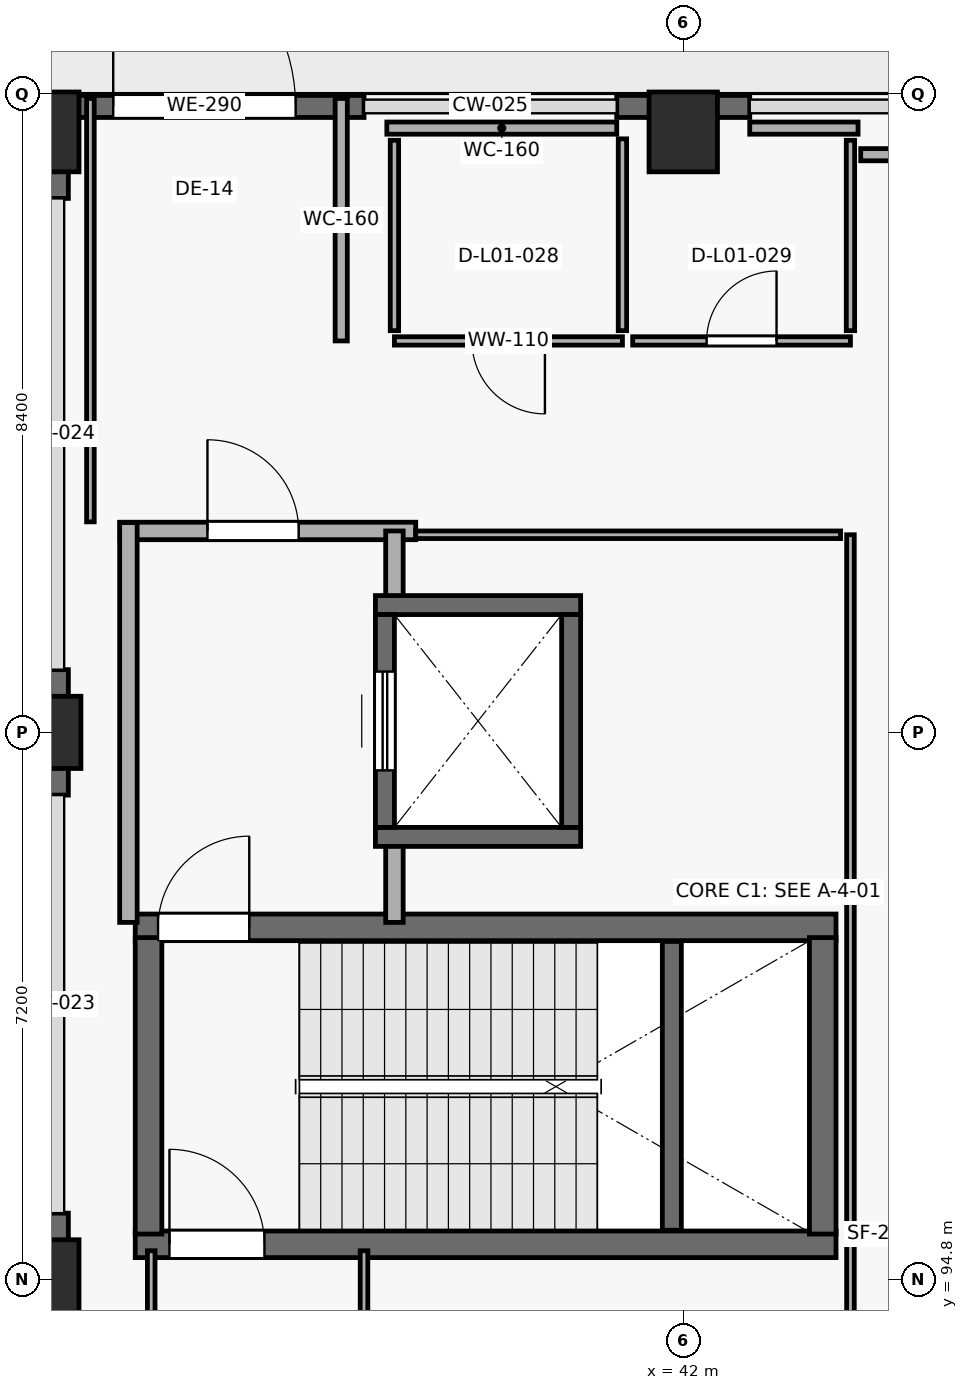
"""IFC4 building model, lengths in metres.
Left out: names, types, materials, properties, quantities, classifications, styles, units other than length and angle.
Written with IfcOpenShell. Run it as: python <this file> out.ifc"""

import sys

from ifc_helpers import new_model, si_unit, direction, frame, frame_2d, origin, origin_2d, place, context, subcontext, project, spatial, rectangle, extrude, element, fill, save


model = new_model("IFC4")
c1 = context("Model", 3, precision=1e-05, world=origin(), true_north=direction((0.0, 1.0)))
c2 = subcontext(c1, "Body", "Model", "MODEL_VIEW")
j1 = project(units=[si_unit("LENGTHUNIT", "METRE"), si_unit("PLANEANGLEUNIT", "RADIAN")], contexts=[c1])
p1 = place(None, origin())
s1 = spatial("IfcSite", under=j1, at=p1, CompositionType="ELEMENT")
p2 = place(p1, origin())
s2 = spatial("IfcBuilding", under=s1, at=p2, CompositionType="ELEMENT")
p3 = place(p2, origin())
s3 = spatial("IfcBuildingStorey", under=s2, at=p3, CompositionType="ELEMENT", Elevation=0.0)
p4 = place(p3, frame((33.6, 94.8, 0.0), z_axis=(0.0, 0.0, 1.0), x_axis=(1.0, 0.0, 0.0)))
e1 = element("IfcColumn", 1, at=p4, inside=s3, PredefinedType="COLUMN", context=c2, shape_type="SweptSolid", body=[
    extrude(rectangle(XDim=0.9, YDim=1.05, at=origin_2d()), origin(), (0.0, 0.0, 1.0), 5.4),
])
p5 = place(p3, frame((33.6, 102.0, 0.0), z_axis=(0.0, 0.0, 1.0), x_axis=(1.0, 0.0, 0.0)))
e2 = element("IfcColumn", 2, at=p5, inside=s3, PredefinedType="COLUMN", context=c2, shape_type="SweptSolid", body=[
    extrude(rectangle(XDim=0.95, YDim=0.95, at=origin_2d()), origin(), (0.0, 0.0, 1.0), 5.4),
])
for number, where, z_axis, x_axis in (
    (3, (33.6, 109.9, 0.0), (0.0, 0.0, 1.0), (1.0, 0.0, 0.0)),
    (4, (42.0, 109.9, 0.0), (0.0, 0.0, 1.0), (1.0, 0.0, 0.0)),
):
    element("IfcColumn", number, at=place(p3, frame(where, z_axis=z_axis, x_axis=x_axis)), inside=s3, PredefinedType="COLUMN", context=c2, shape_type="SweptSolid", body=[
        extrude(rectangle(XDim=0.9, YDim=1.05, at=origin_2d()), origin(), (0.0, 0.0, 1.0), 5.4),
    ])
p6 = place(p3, frame((33.765, 93.925, 0.0), z_axis=(0.0, 0.0, 1.0), x_axis=(0.0, 1.0, 0.0)))
e5 = element("IfcWall", 5, at=p6, inside=s3, PredefinedType="SOLIDWALL", context=c2, shape_type="SweptSolid", body=[
    extrude(rectangle(XDim=1.75, YDim=0.29, at=frame_2d((0.875, 0.0))), origin(), (0.0, 0.0, 1.0), 5.12),
])
p7 = place(p3, frame((33.765, 101.175, 0.0), z_axis=(0.0, 0.0, 1.0), x_axis=(0.0, 1.0, 0.0)))
e6 = element("IfcWall", 6, at=p7, inside=s3, PredefinedType="SOLIDWALL", context=c2, shape_type="SweptSolid", body=[
    extrude(rectangle(XDim=1.65, YDim=0.29, at=frame_2d((0.825, 0.0))), origin(), (0.0, 0.0, 1.0), 5.12),
])
p8 = place(p3, frame((33.765, 109.025, 0.0), z_axis=(0.0, 0.0, 1.0), x_axis=(0.0, 1.0, 0.0)))
e7 = element("IfcWall", 7, at=p8, inside=s3, PredefinedType="SOLIDWALL", context=c2, shape_type="SweptSolid", body=[
    extrude(rectangle(XDim=1.375, YDim=0.29, at=frame_2d((0.688, 0.0))), origin(), (0.0, 0.0, 1.0), 5.12),
])
p9 = place(p3, frame((33.6, 110.235, 0.0), z_axis=(0.0, 0.0, 1.0), x_axis=(1.0, 0.0, 0.0)))
e8 = element("IfcWall", 8, at=p9, inside=s3, PredefinedType="SOLIDWALL", context=c2, shape_type="SweptSolid", body=[
    extrude(rectangle(XDim=4.2, YDim=0.29, at=frame_2d((2.1, 0.0))), origin(), (0.0, 0.0, 1.0), 5.12),
])
p10 = place(p9, frame((0.9, 0.0, 0.0)))
e9 = element("IfcOpeningElement", 9, at=p10, cuts=e8, PredefinedType="OPENING", context=c2, shape_type="SweptSolid", body=[
    extrude(rectangle(XDim=2.4, YDim=2.7, at=frame_2d((1.2, 1.35))), frame((0.0, 0.155, 0.0), z_axis=(0.0, -1.0, 0.0), x_axis=(1.0, 0.0, 0.0)), (0.0, 0.0, 1.0), 0.31),
])
p11 = place(p3, frame((41.125, 110.235, 0.0), z_axis=(0.0, 0.0, 1.0), x_axis=(1.0, 0.0, 0.0)))
e10 = element("IfcWall", 10, at=p11, inside=s3, PredefinedType="SOLIDWALL", context=c2, shape_type="SweptSolid", body=[
    extrude(rectangle(XDim=1.75, YDim=0.29, at=frame_2d((0.875, 0.0))), origin(), (0.0, 0.0, 1.0), 5.12),
])
p12 = place(p3, frame((34.79, 95.265, 0.0), z_axis=(0.0, 0.0, 1.0), x_axis=(1.0, 0.0, 0.0)))
e11 = element("IfcWall", 11, at=p12, inside=s3, PredefinedType="SHEAR", context=c2, shape_type="SweptSolid", body=[
    extrude(rectangle(XDim=9.22, YDim=0.35, at=frame_2d((4.61, 0.0))), origin(), (0.0, 0.0, 1.0), 5.12),
])
p13 = place(p12, frame((0.45, 0.0, 0.0)))
e12 = element("IfcOpeningElement", 12, at=p13, cuts=e11, PredefinedType="OPENING", context=c2, shape_type="SweptSolid", body=[
    extrude(rectangle(XDim=1.25, YDim=2.2, at=frame_2d((0.625, 1.1))), frame((0.0, 0.185, 0.0), z_axis=(0.0, -1.0, 0.0), x_axis=(1.0, 0.0, 0.0)), (0.0, 0.0, 1.0), 0.37),
])
p14 = place(p3, frame((44.01, 99.435, 0.0), z_axis=(0.0, 0.0, 1.0), x_axis=(-1.0, 0.0, 0.0)))
e13 = element("IfcWall", 13, at=p14, inside=s3, PredefinedType="SHEAR", context=c2, shape_type="SweptSolid", body=[
    extrude(rectangle(XDim=9.22, YDim=0.35, at=frame_2d((4.61, 0.0))), origin(), (0.0, 0.0, 1.0), 5.12),
])
p15 = place(p14, frame((7.72, 0.0, 0.0)))
e14 = element("IfcOpeningElement", 14, at=p15, cuts=e13, PredefinedType="OPENING", context=c2, shape_type="SweptSolid", body=[
    extrude(rectangle(XDim=1.2, YDim=2.2, at=frame_2d((0.6, 1.1))), frame((0.0, 0.185, 0.0), z_axis=(0.0, -1.0, 0.0), x_axis=(1.0, 0.0, 0.0)), (0.0, 0.0, 1.0), 0.37),
])
for number, where, z_axis, x_axis in (
    (15, (34.965, 95.4, 0.0), (0.0, 0.0, 1.0), (0.0, 1.0, 0.0)),
    (16, (43.835, 99.3, 0.0), (0.0, 0.0, 1.0), (0.0, -1.0, 0.0)),
):
    element("IfcWall", number, at=place(p3, frame(where, z_axis=z_axis, x_axis=x_axis)), inside=s3, PredefinedType="SHEAR", context=c2, shape_type="SweptSolid", body=[
        extrude(rectangle(XDim=3.9, YDim=0.35, at=frame_2d((1.95, 0.0))), origin(), (0.0, 0.0, 1.0), 5.12),
    ])
p16 = place(p3, frame((41.85, 95.45, 0.0), z_axis=(0.0, 0.0, 1.0), x_axis=(0.0, 1.0, 0.0)))
e17 = element("IfcWall", 17, at=p16, inside=s3, PredefinedType="SHEAR", context=c2, shape_type="SweptSolid", body=[
    extrude(rectangle(XDim=3.8, YDim=0.25, at=frame_2d((1.9, 0.0))), origin(), (0.0, 0.0, 1.0), 2.52),
])
p17 = place(p3, frame((34.59, 104.65, 0.0), z_axis=(0.0, 0.0, 1.0), x_axis=(1.0, 0.0, 0.0)))
e18 = element("IfcWall", 18, at=p17, inside=s3, PredefinedType="PARTITIONING", context=c2, shape_type="SweptSolid", body=[
    extrude(rectangle(XDim=3.89, YDim=0.23, at=frame_2d((1.945, 0.0))), origin(), (0.0, 0.0, 1.0), 5.12),
])
p18 = place(p17, frame((1.15, 0.0, 0.0)))
e19 = element("IfcOpeningElement", 19, at=p18, cuts=e18, PredefinedType="OPENING", context=c2, shape_type="SweptSolid", body=[
    extrude(rectangle(XDim=1.2, YDim=2.2, at=frame_2d((0.6, 1.1))), frame((0.0, 0.125, 0.0), z_axis=(0.0, -1.0, 0.0), x_axis=(1.0, 0.0, 0.0)), (0.0, 0.0, 1.0), 0.25),
])
p19 = place(p3, frame((34.7, 99.5, 0.0), z_axis=(0.0, 0.0, 1.0), x_axis=(0.0, 1.0, 0.0)))
e20 = element("IfcWall", 20, at=p19, inside=s3, PredefinedType="PARTITIONING", context=c2, shape_type="SweptSolid", body=[
    extrude(rectangle(XDim=5.26, YDim=0.23, at=frame_2d((2.63, 0.0))), origin(), (0.0, 0.0, 1.0), 5.12),
])
p20 = place(p3, frame((38.2, 104.65, 0.0), z_axis=(0.0, 0.0, 1.0), x_axis=(0.0, -1.0, 0.0)))
e21 = element("IfcWall", 21, at=p20, inside=s3, PredefinedType="PARTITIONING", context=c2, shape_type="SweptSolid", body=[
    extrude(rectangle(XDim=1.1, YDim=0.23, at=frame_2d((0.55, 0.0))), origin(), (0.0, 0.0, 1.0), 5.12),
])
p21 = place(p3, frame((38.2, 100.75, 0.0), z_axis=(0.0, 0.0, 1.0), x_axis=(0.0, -1.0, 0.0)))
e22 = element("IfcWall", 22, at=p21, inside=s3, PredefinedType="PARTITIONING", context=c2, shape_type="SweptSolid", body=[
    extrude(rectangle(XDim=1.25, YDim=0.23, at=frame_2d((0.625, 0.0))), origin(), (0.0, 0.0, 1.0), 5.12),
])
for number, where, z_axis, x_axis in (
    (23, (37.95, 100.625, 0.0), (0.0, 0.0, 1.0), (1.0, 0.0, 0.0)),
    (24, (40.65, 103.675, 0.0), (0.0, 0.0, 1.0), (-1.0, 0.0, 0.0)),
):
    element("IfcWall", number, at=place(p3, frame(where, z_axis=z_axis, x_axis=x_axis)), inside=s3, PredefinedType="SHEAR", context=c2, shape_type="SweptSolid", body=[
        extrude(rectangle(XDim=2.7, YDim=0.25, at=frame_2d((1.35, 0.0))), origin(), (0.0, 0.0, 1.0), 5.12),
    ])
p22 = place(p3, frame((38.075, 100.75, 0.0), z_axis=(0.0, 0.0, 1.0), x_axis=(0.0, 1.0, 0.0)))
e25 = element("IfcWall", 25, at=p22, inside=s3, PredefinedType="SHEAR", context=c2, shape_type="SweptSolid", body=[
    extrude(rectangle(XDim=2.8, YDim=0.25, at=frame_2d((1.4, 0.0))), origin(), (0.0, 0.0, 1.0), 5.12),
])
p23 = place(p22, frame((0.75, 0.0, 0.0)))
e26 = element("IfcOpeningElement", 26, at=p23, cuts=e25, PredefinedType="OPENING", context=c2, shape_type="SweptSolid", body=[
    extrude(rectangle(XDim=1.3, YDim=2.25, at=frame_2d((0.65, 1.125))), frame((0.0, 0.135, 0.0), z_axis=(0.0, -1.0, 0.0), x_axis=(1.0, 0.0, 0.0)), (0.0, 0.0, 1.0), 0.27),
])
p24 = place(p3, frame((40.525, 103.55, 0.0), z_axis=(0.0, 0.0, 1.0), x_axis=(0.0, -1.0, 0.0)))
e27 = element("IfcWall", 27, at=p24, inside=s3, PredefinedType="SHEAR", context=c2, shape_type="SweptSolid", body=[
    extrude(rectangle(XDim=2.8, YDim=0.25, at=frame_2d((1.4, 0.0))), origin(), (0.0, 0.0, 1.0), 5.12),
])
p25 = place(p3, frame((44.2, 104.6, 0.0), z_axis=(0.0, 0.0, 1.0), x_axis=(0.0, -1.0, 0.0)))
e28 = element("IfcWall", 28, at=p25, inside=s3, PredefinedType="PARTITIONING", context=c2, shape_type="SweptSolid", body=[
    extrude(rectangle(XDim=10.75, YDim=0.1, at=frame_2d((5.375, 0.0))), origin(), (0.0, 0.0, 1.0), 5.12),
])
p26 = place(p3, frame((44.3, 109.95, 0.0), z_axis=(0.0, 0.0, 1.0), x_axis=(-1.0, 0.0, 0.0)))
e29 = element("IfcWall", 29, at=p26, inside=s3, PredefinedType="PARTITIONING", context=c2, shape_type="SweptSolid", body=[
    extrude(rectangle(XDim=1.425, YDim=0.16, at=frame_2d((0.712, 0.0))), origin(), (0.0, 0.0, 1.0), 4.36),
])
p27 = place(p3, frame((41.125, 109.95, 0.0), z_axis=(0.0, 0.0, 1.0), x_axis=(-1.0, 0.0, 0.0)))
e30 = element("IfcWall", 30, at=p27, inside=s3, PredefinedType="PARTITIONING", context=c2, shape_type="SweptSolid", body=[
    extrude(rectangle(XDim=3.025, YDim=0.16, at=frame_2d((1.512, 0.0))), origin(), (0.0, 0.0, 1.0), 4.36),
])
p28 = place(p3, frame((38.48, 104.6, 0.0), z_axis=(0.0, 0.0, 1.0), x_axis=(1.0, 0.0, 0.0)))
e31 = element("IfcWall", 31, at=p28, inside=s3, PredefinedType="PARTITIONING", context=c2, shape_type="SweptSolid", body=[
    extrude(rectangle(XDim=5.59, YDim=0.1, at=frame_2d((2.795, 0.0))), origin(), (0.0, 0.0, 1.0), 5.12),
])
p29 = place(p3, frame((34.2, 110.34, 0.0), z_axis=(0.0, 0.0, 1.0), x_axis=(0.0, -1.0, 0.0)))
e32 = element("IfcWall", 32, at=p29, inside=s3, PredefinedType="PARTITIONING", context=c2, shape_type="SweptSolid", body=[
    extrude(rectangle(XDim=5.57, YDim=0.1, at=frame_2d((2.785, 0.0))), origin(), (0.0, 0.0, 1.0), 4.36),
])
p30 = place(p3, frame((37.5, 107.15, 0.0), z_axis=(0.0, 0.0, 1.0), x_axis=(0.0, 1.0, 0.0)))
e33 = element("IfcWall", 33, at=p30, inside=s3, PredefinedType="PARTITIONING", context=c2, shape_type="SweptSolid", body=[
    extrude(rectangle(XDim=3.19, YDim=0.16, at=frame_2d((1.595, 0.0))), origin(), (0.0, 0.0, 1.0), 5.12),
])
p31 = place(p3, frame((41.2, 107.15, 0.0), z_axis=(0.0, 0.0, 1.0), x_axis=(-1.0, 0.0, 0.0)))
e34 = element("IfcWall", 34, at=p31, inside=s3, PredefinedType="PARTITIONING", context=c2, shape_type="SweptSolid", body=[
    extrude(rectangle(XDim=3.0, YDim=0.11, at=frame_2d((1.5, 0.0))), origin(), (0.0, 0.0, 1.0), 5.12),
])
p32 = place(p31, frame((1.02, 0.0, 0.0)))
e35 = element("IfcOpeningElement", 35, at=p32, cuts=e34, PredefinedType="OPENING", context=c2, shape_type="SweptSolid", body=[
    extrude(rectangle(XDim=0.96, YDim=2.14, at=frame_2d((0.48, 1.07))), frame((0.0, 0.065, 0.0), z_axis=(0.0, -1.0, 0.0), x_axis=(1.0, 0.0, 0.0)), (0.0, 0.0, 1.0), 0.13),
])
p33 = place(p3, frame((44.2, 107.15, 0.0), z_axis=(0.0, 0.0, 1.0), x_axis=(-1.0, 0.0, 0.0)))
e36 = element("IfcWall", 36, at=p33, inside=s3, PredefinedType="PARTITIONING", context=c2, shape_type="SweptSolid", body=[
    extrude(rectangle(XDim=2.865, YDim=0.11, at=frame_2d((1.433, 0.0))), origin(), (0.0, 0.0, 1.0), 5.12),
])
p34 = place(p33, frame((0.972, 0.0, 0.0)))
e37 = element("IfcOpeningElement", 37, at=p34, cuts=e36, PredefinedType="OPENING", context=c2, shape_type="SweptSolid", body=[
    extrude(rectangle(XDim=0.92, YDim=2.12, at=frame_2d((0.46, 1.06))), frame((0.0, 0.065, 0.0), z_axis=(0.0, -1.0, 0.0), x_axis=(1.0, 0.0, 0.0)), (0.0, 0.0, 1.0), 0.13),
])
p35 = place(p3, frame((41.2, 109.809, 0.0), z_axis=(0.0, 0.0, 1.0), x_axis=(0.0, -1.0, 0.0)))
e38 = element("IfcWall", 38, at=p35, inside=s3, PredefinedType="PARTITIONING", context=c2, shape_type="SweptSolid", body=[
    extrude(rectangle(XDim=2.524, YDim=0.11, at=frame_2d((1.262, 0.0))), origin(), (0.0, 0.0, 1.0), 5.12),
])
for number, where, z_axis, x_axis in (
    (39, (38.2, 107.285, 0.0), (0.0, 0.0, 1.0), (0.0, 1.0, 0.0)),
    (40, (44.2, 109.79, 0.0), (0.0, 0.0, 1.0), (0.0, -1.0, 0.0)),
):
    element("IfcWall", number, at=place(p3, frame(where, z_axis=z_axis, x_axis=x_axis)), inside=s3, PredefinedType="PARTITIONING", context=c2, shape_type="SweptSolid", body=[
        extrude(rectangle(XDim=2.505, YDim=0.11, at=frame_2d((1.252, 0.0))), origin(), (0.0, 0.0, 1.0), 5.12),
    ])
p36 = place(p3, frame((46.24, 109.6, 0.0), z_axis=(0.0, 0.0, 1.0), x_axis=(-1.0, 0.0, 0.0)))
e41 = element("IfcWall", 41, at=p36, inside=s3, PredefinedType="PARTITIONING", context=c2, shape_type="SweptSolid", body=[
    extrude(rectangle(XDim=1.905, YDim=0.16, at=frame_2d((0.953, 0.0))), origin(), (0.0, 0.0, 1.0), 4.36),
])
p37 = place(p3, frame((37.8, 93.98, 0.0), z_axis=(0.0, 0.0, 1.0), x_axis=(0.0, 1.0, 0.0)))
e42 = element("IfcWall", 42, at=p37, inside=s3, PredefinedType="PARTITIONING", context=c2, shape_type="SweptSolid", body=[
    extrude(rectangle(XDim=1.2, YDim=0.1, at=frame_2d((0.6, 0.0))), origin(), (0.0, 0.0, 1.0), 5.12),
])
p38 = place(p3, frame((35.0, 95.18, 0.0), z_axis=(0.0, 0.0, 1.0), x_axis=(0.0, -1.0, 0.0)))
e43 = element("IfcWall", 43, at=p38, inside=s3, PredefinedType="PARTITIONING", context=c2, shape_type="SweptSolid", body=[
    extrude(rectangle(XDim=1.33, YDim=0.1, at=frame_2d((0.665, 0.0))), origin(), (0.0, 0.0, 1.0), 5.12),
])
p39 = place(p10, origin())
e44 = element("IfcDoor", 44, at=p39, inside=s3, OperationType="SINGLE_SWING_LEFT", PredefinedType="DOOR", context=c2, shape_type="SweptSolid", body=[
    extrude(rectangle(XDim=2.4, YDim=2.7, at=frame_2d((1.2, 1.35))), frame((0.0, 0.025, 0.0), z_axis=(0.0, -1.0, 0.0), x_axis=(1.0, 0.0, 0.0)), (0.0, 0.0, 1.0), 0.05),
])
fill(e9, e44)
p40 = place(p13, origin())
e45 = element("IfcDoor", 45, at=p40, inside=s3, OperationType="SINGLE_SWING_LEFT", PredefinedType="DOOR", context=c2, shape_type="SweptSolid", body=[
    extrude(rectangle(XDim=1.25, YDim=2.2, at=frame_2d((0.625, 1.1))), frame((0.0, 0.025, 0.0), z_axis=(0.0, -1.0, 0.0), x_axis=(1.0, 0.0, 0.0)), (0.0, 0.0, 1.0), 0.05),
])
fill(e12, e45)
p41 = place(p15, origin())
e46 = element("IfcDoor", 46, at=p41, inside=s3, OperationType="SINGLE_SWING_RIGHT", PredefinedType="DOOR", context=c2, shape_type="SweptSolid", body=[
    extrude(rectangle(XDim=1.2, YDim=2.2, at=frame_2d((0.6, 1.1))), frame((0.0, 0.025, 0.0), z_axis=(0.0, -1.0, 0.0), x_axis=(1.0, 0.0, 0.0)), (0.0, 0.0, 1.0), 0.05),
])
fill(e14, e46)
p42 = place(p18, origin())
e47 = element("IfcDoor", 47, at=p42, inside=s3, OperationType="SINGLE_SWING_LEFT", PredefinedType="DOOR", context=c2, shape_type="SweptSolid", body=[
    extrude(rectangle(XDim=1.2, YDim=2.2, at=frame_2d((0.6, 1.1))), frame((0.0, 0.025, 0.0), z_axis=(0.0, -1.0, 0.0), x_axis=(1.0, 0.0, 0.0)), (0.0, 0.0, 1.0), 0.05),
])
fill(e19, e47)
p43 = place(p23, origin())
e48 = element("IfcDoor", 48, at=p43, inside=s3, OperationType="SLIDING_TO_RIGHT", PredefinedType="DOOR", context=c2, shape_type="SweptSolid", body=[
    extrude(rectangle(XDim=1.3, YDim=2.25, at=frame_2d((0.65, 1.125))), frame((0.0, 0.025, 0.0), z_axis=(0.0, -1.0, 0.0), x_axis=(1.0, 0.0, 0.0)), (0.0, 0.0, 1.0), 0.05),
])
fill(e26, e48)
p44 = place(p32, origin())
e49 = element("IfcDoor", 49, at=p44, inside=s3, OperationType="SINGLE_SWING_LEFT", PredefinedType="DOOR", context=c2, shape_type="SweptSolid", body=[
    extrude(rectangle(XDim=0.96, YDim=2.14, at=frame_2d((0.48, 1.07))), frame((0.0, 0.025, 0.0), z_axis=(0.0, -1.0, 0.0), x_axis=(1.0, 0.0, 0.0)), (0.0, 0.0, 1.0), 0.05),
])
fill(e35, e49)
p45 = place(p34, origin())
e50 = element("IfcDoor", 50, at=p45, inside=s3, OperationType="SINGLE_SWING_RIGHT", PredefinedType="DOOR", context=c2, shape_type="SweptSolid", body=[
    extrude(rectangle(XDim=0.92, YDim=2.12, at=frame_2d((0.46, 1.06))), frame((0.0, 0.025, 0.0), z_axis=(0.0, -1.0, 0.0), x_axis=(1.0, 0.0, 0.0)), (0.0, 0.0, 1.0), 0.05),
])
fill(e37, e50)
save(model, sys.argv[1])
